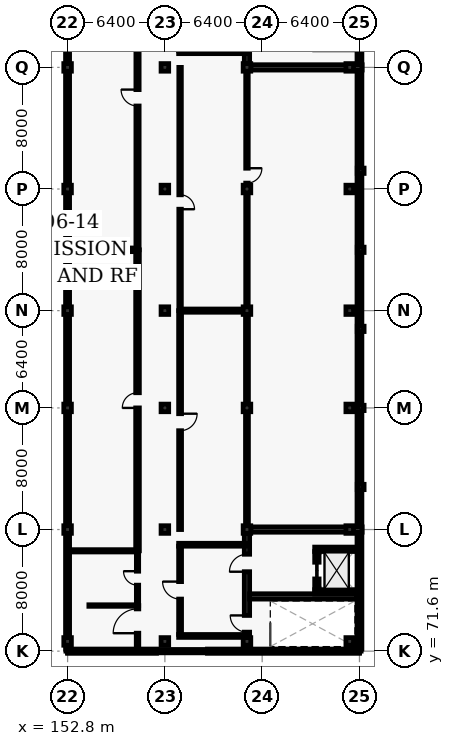
"""IFC4 building model, lengths in metres.
Left out: names, types, materials, properties, quantities, classifications, styles, units other than length and angle.
Written with IfcOpenShell. Run it as: python <this file> out.ifc"""

import sys

from ifc_helpers import new_model, si_unit, direction, frame, frame_2d, origin, origin_2d, place, context, subcontext, project, spatial, rectangle, extrude, element, fill, save


model = new_model("IFC4")
c1 = context("Model", 3, precision=1e-05, world=origin(), true_north=direction((0.0, 1.0)))
c2 = subcontext(c1, "Body", "Model", "MODEL_VIEW")
j1 = project(units=[si_unit("LENGTHUNIT", "METRE"), si_unit("PLANEANGLEUNIT", "RADIAN")], contexts=[c1])
p1 = place(None, origin())
s1 = spatial("IfcSite", under=j1, at=p1, CompositionType="ELEMENT")
p2 = place(p1, origin())
s2 = spatial("IfcBuilding", under=s1, at=p2, CompositionType="ELEMENT")
p3 = place(p2, frame((0.0, 0.0, 29.4)))
s3 = spatial("IfcBuildingStorey", under=s2, at=p3, CompositionType="ELEMENT", Elevation=29.4)
for number, where, z_axis, x_axis in (
    (1, (152.8, 72.24, 0.0), (0.0, 0.0, 1.0), (1.0, 0.0, 0.0)),
    (2, (152.8, 79.6, 0.0), (0.0, 0.0, 1.0), (1.0, 0.0, 0.0)),
    (3, (152.8, 87.6, 0.0), (0.0, 0.0, 1.0), (1.0, 0.0, 0.0)),
    (4, (152.8, 94.0, 0.0), (0.0, 0.0, 1.0), (1.0, 0.0, 0.0)),
    (5, (152.8, 102.0, 0.0), (0.0, 0.0, 1.0), (1.0, 0.0, 0.0)),
    (6, (152.8, 110.0, 0.0), (0.0, 0.0, 1.0), (1.0, 0.0, 0.0)),
    (7, (159.2, 72.24, 0.0), (0.0, 0.0, 1.0), (1.0, 0.0, 0.0)),
    (8, (159.2, 79.6, 0.0), (0.0, 0.0, 1.0), (1.0, 0.0, 0.0)),
    (9, (159.2, 87.6, 0.0), (0.0, 0.0, 1.0), (1.0, 0.0, 0.0)),
    (10, (159.2, 94.0, 0.0), (0.0, 0.0, 1.0), (1.0, 0.0, 0.0)),
    (11, (159.2, 102.0, 0.0), (0.0, 0.0, 1.0), (1.0, 0.0, 0.0)),
    (12, (159.2, 110.0, 0.0), (0.0, 0.0, 1.0), (1.0, 0.0, 0.0)),
    (13, (164.6, 72.24, 0.0), (0.0, 0.0, 1.0), (1.0, 0.0, 0.0)),
    (14, (164.6, 79.6, 0.0), (0.0, 0.0, 1.0), (1.0, 0.0, 0.0)),
    (15, (164.6, 87.6, 0.0), (0.0, 0.0, 1.0), (1.0, 0.0, 0.0)),
    (16, (164.6, 94.0, 0.0), (0.0, 0.0, 1.0), (1.0, 0.0, 0.0)),
    (17, (164.6, 102.0, 0.0), (0.0, 0.0, 1.0), (1.0, 0.0, 0.0)),
    (18, (164.6, 110.0, 0.0), (0.0, 0.0, 1.0), (1.0, 0.0, 0.0)),
    (19, (171.36, 72.24, 0.0), (0.0, 0.0, 1.0), (1.0, 0.0, 0.0)),
    (20, (171.36, 79.6, 0.0), (0.0, 0.0, 1.0), (1.0, 0.0, 0.0)),
    (21, (171.36, 87.6, 0.0), (0.0, 0.0, 1.0), (1.0, 0.0, 0.0)),
    (22, (171.36, 94.0, 0.0), (0.0, 0.0, 1.0), (1.0, 0.0, 0.0)),
    (23, (171.36, 102.0, 0.0), (0.0, 0.0, 1.0), (1.0, 0.0, 0.0)),
    (24, (171.36, 110.0, 0.0), (0.0, 0.0, 1.0), (1.0, 0.0, 0.0)),
):
    element("IfcColumn", number, at=place(p3, frame(where, z_axis=z_axis, x_axis=x_axis)), inside=s3, PredefinedType="COLUMN", context=c2, shape_type="SweptSolid", body=[
        extrude(rectangle(XDim=0.5, YDim=0.5, at=origin_2d()), origin(), (0.0, 0.0, 1.0), 4.5),
    ])
for number, where, z_axis, x_axis in (
    (25, (172.08, 82.4, 0.0), (0.0, 0.0, 1.0), (1.0, 0.0, 0.0)),
    (26, (172.08, 87.6, 0.0), (0.0, 0.0, 1.0), (1.0, 0.0, 0.0)),
    (27, (172.08, 92.8, 0.0), (0.0, 0.0, 1.0), (1.0, 0.0, 0.0)),
    (28, (172.08, 98.0, 0.0), (0.0, 0.0, 1.0), (1.0, 0.0, 0.0)),
    (29, (172.08, 103.2, 0.0), (0.0, 0.0, 1.0), (1.0, 0.0, 0.0)),
):
    element("IfcColumn", number, at=place(p3, frame(where, z_axis=z_axis, x_axis=x_axis)), inside=s3, PredefinedType="PILASTER", context=c2, shape_type="SweptSolid", body=[
        extrude(rectangle(XDim=0.35, YDim=0.45, at=origin_2d()), origin(), (0.0, 0.0, 1.0), 4.5),
    ])
p4 = place(p3, frame((172.0, 117.86, 0.0), z_axis=(0.0, 0.0, 1.0), x_axis=(0.0, -1.0, 0.0)))
e30 = element("IfcWall", 30, at=p4, inside=s3, PredefinedType="SOLIDWALL", context=c2, shape_type="SweptSolid", body=[
    extrude(rectangle(XDim=46.12, YDim=0.32, at=frame_2d((23.06, 0.0))), origin(), (0.0, 0.0, 1.0), 4.255),
])
p5 = place(p3, frame((172.0, 71.6, 0.0), z_axis=(0.0, 0.0, 1.0), x_axis=(-1.0, 0.0, 0.0)))
e31 = element("IfcWall", 31, at=p5, inside=s3, PredefinedType="SOLIDWALL", context=c2, shape_type="SweptSolid", body=[
    extrude(rectangle(XDim=19.2, YDim=0.275, at=frame_2d((9.6, 0.0))), origin(), (0.0, 0.0, 1.0), 4.255),
])
p6 = place(p5, frame((10.0, 0.0, 0.8)))
e32 = element("IfcOpeningElement", 32, at=p6, cuts=e31, PredefinedType="OPENING", context=c2, shape_type="SweptSolid", body=[
    extrude(rectangle(XDim=3.35, YDim=2.9, at=frame_2d((1.675, 1.45))), frame((0.0, 0.147, 0.0), z_axis=(0.0, -1.0, 0.0), x_axis=(1.0, 0.0, 0.0)), (0.0, 0.0, 1.0), 0.295),
])
p7 = place(p3, frame((152.8, 71.74, 0.0), z_axis=(0.0, 0.0, 1.0), x_axis=(0.0, 1.0, 0.0)))
e33 = element("IfcWall", 33, at=p7, inside=s3, PredefinedType="SOLIDWALL", context=c2, shape_type="SweptSolid", body=[
    extrude(rectangle(XDim=46.12, YDim=0.25, at=frame_2d((23.06, 0.0))), origin(), (0.0, 0.0, 1.0), 3.405),
])
p8 = place(p3, frame((172.0, 118.0, 4.5), z_axis=(0.0, 0.0, 1.0), x_axis=(0.0, -1.0, 0.0)))
e34 = element("IfcWall", 34, at=p8, inside=s3, PredefinedType="PARAPET", context=c2, shape_type="SweptSolid", body=[
    extrude(rectangle(XDim=46.4, YDim=0.22, at=frame_2d((23.2, 0.0))), origin(), (0.0, 0.0, 1.0), 0.95),
])
p9 = place(p3, frame((172.0, 71.6, 4.5), z_axis=(0.0, 0.0, 1.0), x_axis=(-1.0, 0.0, 0.0)))
e35 = element("IfcWall", 35, at=p9, inside=s3, PredefinedType="PARAPET", context=c2, shape_type="SweptSolid", body=[
    extrude(rectangle(XDim=19.2, YDim=0.22, at=frame_2d((9.6, 0.0))), origin(), (0.0, 0.0, 1.0), 0.95),
])
p10 = place(p3, frame((152.8, 71.6, 4.5), z_axis=(0.0, 0.0, 1.0), x_axis=(0.0, 1.0, 0.0)))
e36 = element("IfcWall", 36, at=p10, inside=s3, PredefinedType="PARAPET", context=c2, shape_type="SweptSolid", body=[
    extrude(rectangle(XDim=46.4, YDim=0.22, at=frame_2d((23.2, 0.0))), origin(), (0.0, 0.0, 1.0), 0.95),
])
p11 = place(p3, frame((164.852, 79.6, 0.0), z_axis=(0.0, 0.0, 1.0), x_axis=(1.0, 0.0, 0.0)))
e37 = element("IfcWall", 37, at=p11, inside=s3, PredefinedType="SHEAR", context=c2, shape_type="SweptSolid", body=[
    extrude(rectangle(XDim=7.323, YDim=0.35, at=frame_2d((3.662, 0.0))), origin(), (0.0, 0.0, 1.0), 4.255),
])
p12 = place(p3, frame((164.6, 71.775, 0.0), z_axis=(0.0, 0.0, 1.0), x_axis=(0.0, 1.0, 0.0)))
e38 = element("IfcWall", 38, at=p12, inside=s3, PredefinedType="SHEAR", context=c2, shape_type="SweptSolid", body=[
    extrude(rectangle(XDim=7.573, YDim=0.35, at=frame_2d((3.787, 0.0))), origin(), (0.0, 0.0, 1.0), 4.255),
])
p13 = place(p12, frame((1.075, 0.0, 0.0)))
e39 = element("IfcOpeningElement", 39, at=p13, cuts=e38, PredefinedType="OPENING", context=c2, shape_type="SweptSolid", body=[
    extrude(rectangle(XDim=1.1, YDim=2.15, at=frame_2d((0.55, 1.075))), frame((0.0, 0.185, 0.0), z_axis=(0.0, -1.0, 0.0), x_axis=(1.0, 0.0, 0.0)), (0.0, 0.0, 1.0), 0.37),
])
p14 = place(p12, frame((5.05, 0.0, 0.0)))
e40 = element("IfcOpeningElement", 40, at=p14, cuts=e38, PredefinedType="OPENING", context=c2, shape_type="SweptSolid", body=[
    extrude(rectangle(XDim=1.15, YDim=2.2, at=frame_2d((0.575, 1.1))), frame((0.0, 0.185, 0.0), z_axis=(0.0, -1.0, 0.0), x_axis=(1.0, 0.0, 0.0)), (0.0, 0.0, 1.0), 0.37),
])
p15 = place(p3, frame((164.775, 75.2, 0.0), z_axis=(0.0, 0.0, 1.0), x_axis=(1.0, 0.0, 0.0)))
e41 = element("IfcWall", 41, at=p15, inside=s3, PredefinedType="SHEAR", context=c2, shape_type="SweptSolid", body=[
    extrude(rectangle(XDim=7.05, YDim=0.35, at=frame_2d((3.525, 0.0))), origin(), (0.0, 0.0, 1.0), 4.255),
])
for number, where, z_axis, x_axis in (
    (42, (169.055, 75.5, 0.0), (0.0, 0.0, 1.0), (1.0, 0.0, 0.0)),
    (43, (169.055, 78.3, 0.0), (0.0, 0.0, 1.0), (1.0, 0.0, 0.0)),
):
    element("IfcWall", number, at=place(p3, frame(where, z_axis=z_axis, x_axis=x_axis)), inside=s3, PredefinedType="SHEAR", context=c2, shape_type="SweptSolid", body=[
        extrude(rectangle(XDim=2.89, YDim=0.29, at=frame_2d((1.445, 0.0))), origin(), (0.0, 0.0, 1.0), 4.255),
    ])
p16 = place(p3, frame((169.2, 75.645, 0.0), z_axis=(0.0, 0.0, 1.0), x_axis=(0.0, 1.0, 0.0)))
e44 = element("IfcWall", 44, at=p16, inside=s3, PredefinedType="SHEAR", context=c2, shape_type="SweptSolid", body=[
    extrude(rectangle(XDim=2.51, YDim=0.29, at=frame_2d((1.255, 0.0))), origin(), (0.0, 0.0, 1.0), 4.255),
])
p17 = place(p16, frame((0.705, 0.0, 0.0)))
e45 = element("IfcOpeningElement", 45, at=p17, cuts=e44, PredefinedType="OPENING", context=c2, shape_type="SweptSolid", body=[
    extrude(rectangle(XDim=1.1, YDim=2.15, at=frame_2d((0.55, 1.075))), frame((0.0, 0.155, 0.0), z_axis=(0.0, -1.0, 0.0), x_axis=(1.0, 0.0, 0.0)), (0.0, 0.0, 1.0), 0.31),
])
p18 = place(p3, frame((160.105, 72.6, 0.0), z_axis=(0.0, 0.0, 1.0), x_axis=(1.0, 0.0, 0.0)))
e46 = element("IfcWall", 46, at=p18, inside=s3, PredefinedType="PARTITIONING", context=c2, shape_type="SweptSolid", body=[
    extrude(rectangle(XDim=4.495, YDim=0.19, at=frame_2d((2.248, 0.0))), origin(), (0.0, 0.0, 1.0), 3.605),
])
p19 = place(p3, frame((160.105, 78.6, 0.0), z_axis=(0.0, 0.0, 1.0), x_axis=(1.0, 0.0, 0.0)))
e47 = element("IfcWall", 47, at=p19, inside=s3, PredefinedType="PARTITIONING", context=c2, shape_type="SweptSolid", body=[
    extrude(rectangle(XDim=4.495, YDim=0.19, at=frame_2d((2.248, 0.0))), origin(), (0.0, 0.0, 1.0), 4.255),
])
p20 = place(p3, frame((160.2, 72.695, 0.0), z_axis=(0.0, 0.0, 1.0), x_axis=(0.0, 1.0, 0.0)))
e48 = element("IfcWall", 48, at=p20, inside=s3, PredefinedType="PARTITIONING", context=c2, shape_type="SweptSolid", body=[
    extrude(rectangle(XDim=5.81, YDim=0.19, at=frame_2d((2.905, 0.0))), origin(), (0.0, 0.0, 1.0), 4.255),
])
p21 = place(p20, frame((2.33, 0.0, 0.0)))
e49 = element("IfcOpeningElement", 49, at=p21, cuts=e48, PredefinedType="OPENING", context=c2, shape_type="SweptSolid", body=[
    extrude(rectangle(XDim=1.15, YDim=2.2, at=frame_2d((0.575, 1.1))), frame((0.0, 0.105, 0.0), z_axis=(0.0, -1.0, 0.0), x_axis=(1.0, 0.0, 0.0)), (0.0, 0.0, 1.0), 0.21),
])
p22 = place(p3, frame((164.852, 110.0, 0.0), z_axis=(0.0, 0.0, 1.0), x_axis=(1.0, 0.0, 0.0)))
e50 = element("IfcWall", 50, at=p22, inside=s3, PredefinedType="SHEAR", context=c2, shape_type="SweptSolid", body=[
    extrude(rectangle(XDim=7.323, YDim=0.35, at=frame_2d((3.662, 0.0))), origin(), (0.0, 0.0, 1.0), 4.255),
])
p23 = place(p3, frame((164.6, 110.252, 0.0), z_axis=(0.0, 0.0, 1.0), x_axis=(0.0, 1.0, 0.0)))
e51 = element("IfcWall", 51, at=p23, inside=s3, PredefinedType="SHEAR", context=c2, shape_type="SweptSolid", body=[
    extrude(rectangle(XDim=7.573, YDim=0.35, at=frame_2d((3.787, 0.0))), origin(), (0.0, 0.0, 1.0), 4.255),
])
p24 = place(p23, frame((5.398, 0.0, 0.0)))
e52 = element("IfcOpeningElement", 52, at=p24, cuts=e51, PredefinedType="OPENING", context=c2, shape_type="SweptSolid", body=[
    extrude(rectangle(XDim=1.1, YDim=2.15, at=frame_2d((0.55, 1.075))), frame((0.0, 0.185, 0.0), z_axis=(0.0, -1.0, 0.0), x_axis=(1.0, 0.0, 0.0)), (0.0, 0.0, 1.0), 0.37),
])
p25 = place(p23, frame((1.373, 0.0, 0.0)))
e53 = element("IfcOpeningElement", 53, at=p25, cuts=e51, PredefinedType="OPENING", context=c2, shape_type="SweptSolid", body=[
    extrude(rectangle(XDim=1.15, YDim=2.2, at=frame_2d((0.575, 1.1))), frame((0.0, 0.185, 0.0), z_axis=(0.0, -1.0, 0.0), x_axis=(1.0, 0.0, 0.0)), (0.0, 0.0, 1.0), 0.37),
])
p26 = place(p3, frame((160.105, 111.0, 0.0), z_axis=(0.0, 0.0, 1.0), x_axis=(1.0, 0.0, 0.0)))
e54 = element("IfcWall", 54, at=p26, inside=s3, PredefinedType="PARTITIONING", context=c2, shape_type="SweptSolid", body=[
    extrude(rectangle(XDim=4.495, YDim=0.19, at=frame_2d((2.248, 0.0))), origin(), (0.0, 0.0, 1.0), 4.255),
])
p27 = place(p3, frame((157.4, 71.6, 0.0), z_axis=(0.0, 0.0, 1.0), x_axis=(0.0, 1.0, 0.0)))
e55 = element("IfcWall", 55, at=p27, inside=s3, PredefinedType="PARTITIONING", context=c2, shape_type="SweptSolid", body=[
    extrude(rectangle(XDim=3.0, YDim=0.165, at=frame_2d((1.5, 0.0))), origin(), (0.0, 0.0, 1.0), 4.255),
])
p28 = place(p27, frame((1.18, 0.0, 0.0)))
e56 = element("IfcOpeningElement", 56, at=p28, cuts=e55, PredefinedType="OPENING", context=c2, shape_type="SweptSolid", body=[
    extrude(rectangle(XDim=1.6, YDim=2.3, at=frame_2d((0.8, 1.15))), frame((0.0, 0.093, 0.0), z_axis=(0.0, -1.0, 0.0), x_axis=(1.0, 0.0, 0.0)), (0.0, 0.0, 1.0), 0.185),
])
p29 = place(p3, frame((157.4, 74.6, 0.0), z_axis=(0.0, 0.0, 1.0), x_axis=(0.0, 1.0, 0.0)))
e57 = element("IfcWall", 57, at=p29, inside=s3, PredefinedType="PARTITIONING", context=c2, shape_type="SweptSolid", body=[
    extrude(rectangle(XDim=3.6, YDim=0.15, at=frame_2d((1.8, 0.0))), origin(), (0.0, 0.0, 1.0), 4.255),
])
p30 = place(p29, frame((1.34, 0.0, 0.0)))
e58 = element("IfcOpeningElement", 58, at=p30, cuts=e57, PredefinedType="OPENING", context=c2, shape_type="SweptSolid", body=[
    extrude(rectangle(XDim=0.92, YDim=2.1, at=frame_2d((0.46, 1.05))), frame((0.0, 0.085, 0.0), z_axis=(0.0, -1.0, 0.0), x_axis=(1.0, 0.0, 0.0)), (0.0, 0.0, 1.0), 0.17),
])
p31 = place(p3, frame((157.4, 78.2, 0.0), z_axis=(0.0, 0.0, 1.0), x_axis=(0.0, 1.0, 0.0)))
e59 = element("IfcWall", 59, at=p31, inside=s3, PredefinedType="PARTITIONING", context=c2, shape_type="SweptSolid", body=[
    extrude(rectangle(XDim=19.8, YDim=0.24, at=frame_2d((9.9, 0.0))), origin(), (0.0, 0.0, 1.0), 4.255),
])
p32 = place(p31, frame((9.4, 0.0, 0.0)))
e60 = element("IfcOpeningElement", 60, at=p32, cuts=e59, PredefinedType="OPENING", context=c2, shape_type="SweptSolid", body=[
    extrude(rectangle(XDim=1.0, YDim=2.1, at=frame_2d((0.5, 1.05))), frame((0.0, 0.13, 0.0), z_axis=(0.0, -1.0, 0.0), x_axis=(1.0, 0.0, 0.0)), (0.0, 0.0, 1.0), 0.26),
])
p33 = place(p3, frame((157.4, 98.0, 0.0), z_axis=(0.0, 0.0, 1.0), x_axis=(0.0, 1.0, 0.0)))
e61 = element("IfcWall", 61, at=p33, inside=s3, PredefinedType="PARTITIONING", context=c2, shape_type="SweptSolid", body=[
    extrude(rectangle(XDim=20.0, YDim=0.21, at=frame_2d((10.0, 0.0))), origin(), (0.0, 0.0, 1.0), 4.255),
])
p34 = place(p33, frame((9.46, 0.0, 0.0)))
e62 = element("IfcOpeningElement", 62, at=p34, cuts=e61, PredefinedType="OPENING", context=c2, shape_type="SweptSolid", body=[
    extrude(rectangle(XDim=1.08, YDim=2.15, at=frame_2d((0.54, 1.075))), frame((0.0, 0.115, 0.0), z_axis=(0.0, -1.0, 0.0), x_axis=(1.0, 0.0, 0.0)), (0.0, 0.0, 1.0), 0.23),
])
p35 = place(p3, frame((160.2, 94.0, 0.0), z_axis=(0.0, 0.0, 1.0), x_axis=(0.0, -1.0, 0.0)))
e63 = element("IfcWall", 63, at=p35, inside=s3, PredefinedType="PARTITIONING", context=c2, shape_type="SweptSolid", body=[
    extrude(rectangle(XDim=14.4, YDim=0.19, at=frame_2d((7.2, 0.0))), origin(), (0.0, 0.0, 1.0), 4.255),
])
p36 = place(p35, frame((6.78, 0.0, 0.0)))
e64 = element("IfcOpeningElement", 64, at=p36, cuts=e63, PredefinedType="OPENING", context=c2, shape_type="SweptSolid", body=[
    extrude(rectangle(XDim=1.12, YDim=2.15, at=frame_2d((0.56, 1.075))), frame((0.0, 0.105, 0.0), z_axis=(0.0, -1.0, 0.0), x_axis=(1.0, 0.0, 0.0)), (0.0, 0.0, 1.0), 0.21),
])
p37 = place(p3, frame((160.2, 110.0, 0.0), z_axis=(0.0, 0.0, 1.0), x_axis=(0.0, -1.0, 0.0)))
e65 = element("IfcWall", 65, at=p37, inside=s3, PredefinedType="PARTITIONING", context=c2, shape_type="SweptSolid", body=[
    extrude(rectangle(XDim=16.0, YDim=0.165, at=frame_2d((8.0, 0.0))), origin(), (0.0, 0.0, 1.0), 4.255),
])
p38 = place(p37, frame((8.38, 0.0, 0.0)))
e66 = element("IfcOpeningElement", 66, at=p38, cuts=e65, PredefinedType="OPENING", context=c2, shape_type="SweptSolid", body=[
    extrude(rectangle(XDim=0.95, YDim=2.1, at=frame_2d((0.475, 1.05))), frame((0.0, 0.093, 0.0), z_axis=(0.0, -1.0, 0.0), x_axis=(1.0, 0.0, 0.0)), (0.0, 0.0, 1.0), 0.185),
])
p39 = place(p3, frame((154.2, 74.6, 0.0), z_axis=(0.0, 0.0, 1.0), x_axis=(1.0, 0.0, 0.0)))
e67 = element("IfcWall", 67, at=p39, inside=s3, PredefinedType="PARTITIONING", context=c2, shape_type="SweptSolid", body=[
    extrude(rectangle(XDim=3.2, YDim=0.1, at=frame_2d((1.6, 0.0))), origin(), (0.0, 0.0, 1.0), 4.255),
])
p40 = place(p3, frame((152.8, 78.2, 0.0), z_axis=(0.0, 0.0, 1.0), x_axis=(1.0, 0.0, 0.0)))
e68 = element("IfcWall", 68, at=p40, inside=s3, PredefinedType="PARTITIONING", context=c2, shape_type="SweptSolid", body=[
    extrude(rectangle(XDim=4.6, YDim=0.15, at=frame_2d((2.3, 0.0))), origin(), (0.0, 0.0, 1.0), 4.255),
])
p41 = place(p3, frame((152.8, 98.0, 0.0), z_axis=(0.0, 0.0, 1.0), x_axis=(1.0, 0.0, 0.0)))
e69 = element("IfcWall", 69, at=p41, inside=s3, PredefinedType="PARTITIONING", context=c2, shape_type="SweptSolid", body=[
    extrude(rectangle(XDim=4.6, YDim=0.24, at=frame_2d((2.3, 0.0))), origin(), (0.0, 0.0, 1.0), 4.255),
])
p42 = place(p3, frame((160.2, 94.0, 0.0), z_axis=(0.0, 0.0, 1.0), x_axis=(1.0, 0.0, 0.0)))
e70 = element("IfcWall", 70, at=p42, inside=s3, PredefinedType="PARTITIONING", context=c2, shape_type="SweptSolid", body=[
    extrude(rectangle(XDim=4.148, YDim=0.21, at=frame_2d((2.074, 0.0))), origin(), (0.0, 0.0, 1.0), 3.605),
])
p43 = place(p3, frame((164.6, 93.748, 0.0), z_axis=(0.0, 0.0, 1.0), x_axis=(0.0, -1.0, 0.0)))
e71 = element("IfcWall", 71, at=p43, inside=s3, PredefinedType="PARTITIONING", context=c2, shape_type="SweptSolid", body=[
    extrude(rectangle(XDim=13.896, YDim=0.19, at=frame_2d((6.948, 0.0))), origin(), (0.0, 0.0, 1.0), 3.405),
])
p44 = place(p3, frame((164.6, 109.748, 0.0), z_axis=(0.0, 0.0, 1.0), x_axis=(0.0, -1.0, 0.0)))
e72 = element("IfcWall", 72, at=p44, inside=s3, PredefinedType="PARTITIONING", context=c2, shape_type="SweptSolid", body=[
    extrude(rectangle(XDim=15.496, YDim=0.165, at=frame_2d((7.748, 0.0))), origin(), (0.0, 0.0, 1.0), 3.405),
])
p45 = place(p44, frame((6.38, 0.0, 0.0)))
e73 = element("IfcOpeningElement", 73, at=p45, cuts=e72, PredefinedType="OPENING", context=c2, shape_type="SweptSolid", body=[
    extrude(rectangle(XDim=0.98, YDim=2.1, at=frame_2d((0.49, 1.05))), frame((0.0, 0.093, 0.0), z_axis=(0.0, -1.0, 0.0), x_axis=(1.0, 0.0, 0.0)), (0.0, 0.0, 1.0), 0.185),
])
p46 = place(p6, origin())
e74 = element("IfcWindow", 74, at=p46, inside=s3, PartitioningType="SINGLE_PANEL", PredefinedType="WINDOW", context=c2, shape_type="SweptSolid", body=[
    extrude(rectangle(XDim=3.35, YDim=2.9, at=frame_2d((1.675, 1.45))), frame((0.0, 0.03, 0.0), z_axis=(0.0, -1.0, 0.0), x_axis=(1.0, 0.0, 0.0)), (0.0, 0.0, 1.0), 0.06),
])
fill(e32, e74)
p47 = place(p13, origin())
e75 = element("IfcDoor", 75, at=p47, inside=s3, OperationType="SINGLE_SWING_RIGHT", PredefinedType="DOOR", context=c2, shape_type="SweptSolid", body=[
    extrude(rectangle(XDim=1.1, YDim=2.15, at=frame_2d((0.55, 1.075))), frame((0.0, 0.025, 0.0), z_axis=(0.0, -1.0, 0.0), x_axis=(1.0, 0.0, 0.0)), (0.0, 0.0, 1.0), 0.05),
])
fill(e39, e75)
p48 = place(p14, origin())
e76 = element("IfcDoor", 76, at=p48, inside=s3, OperationType="SINGLE_SWING_LEFT", PredefinedType="DOOR", context=c2, shape_type="SweptSolid", body=[
    extrude(rectangle(XDim=1.15, YDim=2.2, at=frame_2d((0.575, 1.1))), frame((0.0, 0.025, 0.0), z_axis=(0.0, -1.0, 0.0), x_axis=(1.0, 0.0, 0.0)), (0.0, 0.0, 1.0), 0.05),
])
fill(e40, e76)
p49 = place(p17, origin())
e77 = element("IfcDoor", 77, at=p49, inside=s3, OperationType="SLIDING_TO_LEFT", PredefinedType="DOOR", context=c2, shape_type="SweptSolid", body=[
    extrude(rectangle(XDim=1.1, YDim=2.15, at=frame_2d((0.55, 1.075))), frame((0.0, 0.025, 0.0), z_axis=(0.0, -1.0, 0.0), x_axis=(1.0, 0.0, 0.0)), (0.0, 0.0, 1.0), 0.05),
])
fill(e45, e77)
p50 = place(p21, origin())
e78 = element("IfcDoor", 78, at=p50, inside=s3, OperationType="SINGLE_SWING_RIGHT", PredefinedType="DOOR", context=c2, shape_type="SweptSolid", body=[
    extrude(rectangle(XDim=1.15, YDim=2.2, at=frame_2d((0.575, 1.1))), frame((0.0, 0.025, 0.0), z_axis=(0.0, -1.0, 0.0), x_axis=(1.0, 0.0, 0.0)), (0.0, 0.0, 1.0), 0.05),
])
fill(e49, e78)
p51 = place(p28, origin())
e79 = element("IfcDoor", 79, at=p51, inside=s3, OperationType="SINGLE_SWING_LEFT", PredefinedType="DOOR", context=c2, shape_type="SweptSolid", body=[
    extrude(rectangle(XDim=1.6, YDim=2.3, at=frame_2d((0.8, 1.15))), frame((0.0, 0.025, 0.0), z_axis=(0.0, -1.0, 0.0), x_axis=(1.0, 0.0, 0.0)), (0.0, 0.0, 1.0), 0.05),
])
fill(e56, e79)
p52 = place(p30, origin())
e80 = element("IfcDoor", 80, at=p52, inside=s3, OperationType="SINGLE_SWING_RIGHT", PredefinedType="DOOR", context=c2, shape_type="SweptSolid", body=[
    extrude(rectangle(XDim=0.92, YDim=2.1, at=frame_2d((0.46, 1.05))), frame((0.0, 0.025, 0.0), z_axis=(0.0, -1.0, 0.0), x_axis=(1.0, 0.0, 0.0)), (0.0, 0.0, 1.0), 0.05),
])
fill(e58, e80)
p53 = place(p32, origin())
e81 = element("IfcDoor", 81, at=p53, inside=s3, OperationType="SINGLE_SWING_LEFT", PredefinedType="DOOR", context=c2, shape_type="SweptSolid", body=[
    extrude(rectangle(XDim=1.0, YDim=2.1, at=frame_2d((0.5, 1.05))), frame((0.0, 0.025, 0.0), z_axis=(0.0, -1.0, 0.0), x_axis=(1.0, 0.0, 0.0)), (0.0, 0.0, 1.0), 0.05),
])
fill(e60, e81)
p54 = place(p34, origin())
e82 = element("IfcDoor", 82, at=p54, inside=s3, OperationType="SINGLE_SWING_RIGHT", PredefinedType="DOOR", context=c2, shape_type="SweptSolid", body=[
    extrude(rectangle(XDim=1.08, YDim=2.15, at=frame_2d((0.54, 1.075))), frame((0.0, 0.025, 0.0), z_axis=(0.0, -1.0, 0.0), x_axis=(1.0, 0.0, 0.0)), (0.0, 0.0, 1.0), 0.05),
])
fill(e62, e82)
p55 = place(p36, origin())
e83 = element("IfcDoor", 83, at=p55, inside=s3, OperationType="SINGLE_SWING_LEFT", PredefinedType="DOOR", context=c2, shape_type="SweptSolid", body=[
    extrude(rectangle(XDim=1.12, YDim=2.15, at=frame_2d((0.56, 1.075))), frame((0.0, 0.025, 0.0), z_axis=(0.0, -1.0, 0.0), x_axis=(1.0, 0.0, 0.0)), (0.0, 0.0, 1.0), 0.05),
])
fill(e64, e83)
p56 = place(p38, origin())
e84 = element("IfcDoor", 84, at=p56, inside=s3, OperationType="SINGLE_SWING_RIGHT", PredefinedType="DOOR", context=c2, shape_type="SweptSolid", body=[
    extrude(rectangle(XDim=0.95, YDim=2.1, at=frame_2d((0.475, 1.05))), frame((0.0, 0.025, 0.0), z_axis=(0.0, -1.0, 0.0), x_axis=(1.0, 0.0, 0.0)), (0.0, 0.0, 1.0), 0.05),
])
fill(e66, e84)
p57 = place(p45, origin())
e85 = element("IfcDoor", 85, at=p57, inside=s3, OperationType="SINGLE_SWING_LEFT", PredefinedType="DOOR", context=c2, shape_type="SweptSolid", body=[
    extrude(rectangle(XDim=0.98, YDim=2.1, at=frame_2d((0.49, 1.05))), frame((0.0, 0.025, 0.0), z_axis=(0.0, -1.0, 0.0), x_axis=(1.0, 0.0, 0.0)), (0.0, 0.0, 1.0), 0.05),
])
fill(e73, e85)
save(model, sys.argv[1])
